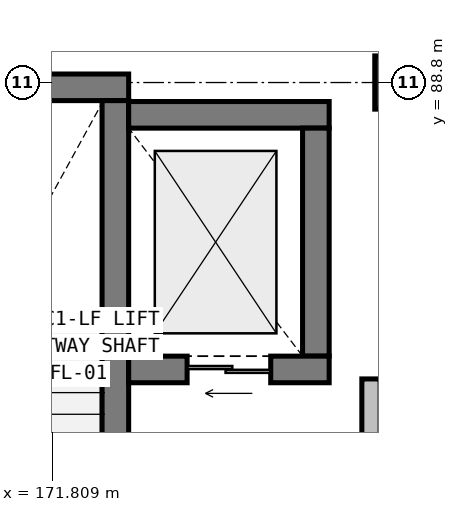
"""IFC4 building model, lengths in metres.
Left out: names, types, materials, properties, quantities, classifications, styles, units other than length and angle.
Written with IfcOpenShell. Run it as: python <this file> out.ifc"""

import sys

from ifc_helpers import new_model, si_unit, direction, frame, frame_2d, origin, origin_2d, place, context, subcontext, project, spatial, rectangle, extrude, element, fill, save


model = new_model("IFC4")
c1 = context("Model", 3, precision=1e-05, world=origin(), true_north=direction((0.0, 1.0)))
c2 = subcontext(c1, "Body", "Model", "MODEL_VIEW")
j1 = project(units=[si_unit("LENGTHUNIT", "METRE"), si_unit("PLANEANGLEUNIT", "RADIAN")], contexts=[c1])
p1 = place(None, origin())
s1 = spatial("IfcSite", under=j1, at=p1, CompositionType="ELEMENT")
p2 = place(p1, origin())
s2 = spatial("IfcBuilding", under=s1, at=p2, CompositionType="ELEMENT")
p3 = place(p2, frame((0.0, 0.0, 11.4)))
s3 = spatial("IfcBuildingStorey", under=s2, at=p3, CompositionType="ELEMENT", Elevation=11.4)
p4 = place(p3, frame((176.4, 88.8, 0.0), z_axis=(0.0, 0.0, 1.0), x_axis=(1.0, 0.0, 0.0)))
e1 = element("IfcColumn", 1, at=p4, inside=s3, PredefinedType="COLUMN", context=c2, shape_type="SweptSolid", body=[
    extrude(rectangle(XDim=0.7, YDim=0.7, at=origin_2d()), origin(), (0.0, 0.0, 1.0), 5.4),
])
p5 = place(p3, frame((168.188, 88.737, 0.0), z_axis=(0.0, 0.0, 1.0), x_axis=(1.0, 0.0, 0.0)))
e2 = element("IfcWall", 2, at=p5, inside=s3, PredefinedType="SHEAR", context=c2, shape_type="SweptSolid", body=[
    extrude(rectangle(XDim=4.624, YDim=0.35, at=frame_2d((2.312, 0.0))), origin(), (0.0, 0.0, 1.0), 5.1),
])
p6 = place(p3, frame((172.637, 88.562, 0.0), z_axis=(0.0, 0.0, 1.0), x_axis=(0.0, -1.0, 0.0)))
e3 = element("IfcWall", 3, at=p6, inside=s3, PredefinedType="SHEAR", context=c2, shape_type="SweptSolid", body=[
    extrude(rectangle(XDim=9.124, YDim=0.35, at=frame_2d((4.562, 0.0))), origin(), (0.0, 0.0, 1.0), 5.1),
])
p7 = place(p3, frame((172.812, 88.375, 0.0), z_axis=(0.0, 0.0, 1.0), x_axis=(1.0, 0.0, 0.0)))
e4 = element("IfcWall", 4, at=p7, inside=s3, PredefinedType="SHEAR", context=c2, shape_type="SweptSolid", body=[
    extrude(rectangle(XDim=2.638, YDim=0.35, at=frame_2d((1.319, 0.0))), origin(), (0.0, 0.0, 1.0), 5.1),
])
p8 = place(p3, frame((175.275, 88.2, 0.0), z_axis=(0.0, 0.0, 1.0), x_axis=(0.0, -1.0, 0.0)))
e5 = element("IfcWall", 5, at=p8, inside=s3, PredefinedType="SHEAR", context=c2, shape_type="SweptSolid", body=[
    extrude(rectangle(XDim=3.0, YDim=0.35, at=frame_2d((1.5, 0.0))), origin(), (0.0, 0.0, 1.0), 5.1),
])
p9 = place(p3, frame((175.45, 85.025, 0.0), z_axis=(0.0, 0.0, 1.0), x_axis=(-1.0, 0.0, 0.0)))
e6 = element("IfcWall", 6, at=p9, inside=s3, PredefinedType="SHEAR", context=c2, shape_type="SweptSolid", body=[
    extrude(rectangle(XDim=2.638, YDim=0.35, at=frame_2d((1.319, 0.0))), origin(), (0.0, 0.0, 1.0), 5.1),
])
p10 = place(p9, frame((0.769, 0.0, 0.0)))
e7 = element("IfcOpeningElement", 7, at=p10, cuts=e6, PredefinedType="OPENING", context=c2, shape_type="SweptSolid", body=[
    extrude(rectangle(XDim=1.1, YDim=2.2, at=frame_2d((0.55, 1.1))), frame((0.0, 0.185, 0.0), z_axis=(0.0, -1.0, 0.0), x_axis=(1.0, 0.0, 0.0)), (0.0, 0.0, 1.0), 0.37),
])
p11 = place(p3, frame((176.0, 84.9, 0.0), z_axis=(0.0, 0.0, 1.0), x_axis=(0.0, -1.0, 0.0)))
e8 = element("IfcWall", 8, at=p11, inside=s3, PredefinedType="PARTITIONING", context=c2, shape_type="SweptSolid", body=[
    extrude(rectangle(XDim=5.5, YDim=0.24, at=frame_2d((2.75, 0.0))), origin(), (0.0, 0.0, 1.0), 4.425),
])
p12 = place(p10, origin())
e9 = element("IfcDoor", 9, at=p12, inside=s3, OperationType="DOUBLE_DOOR_SLIDING", PredefinedType="DOOR", context=c2, shape_type="SweptSolid", body=[
    extrude(rectangle(XDim=1.1, YDim=2.2, at=frame_2d((0.55, 1.1))), frame((0.0, 0.025, 0.0), z_axis=(0.0, -1.0, 0.0), x_axis=(1.0, 0.0, 0.0)), (0.0, 0.0, 1.0), 0.05),
])
fill(e7, e9)
save(model, sys.argv[1])
